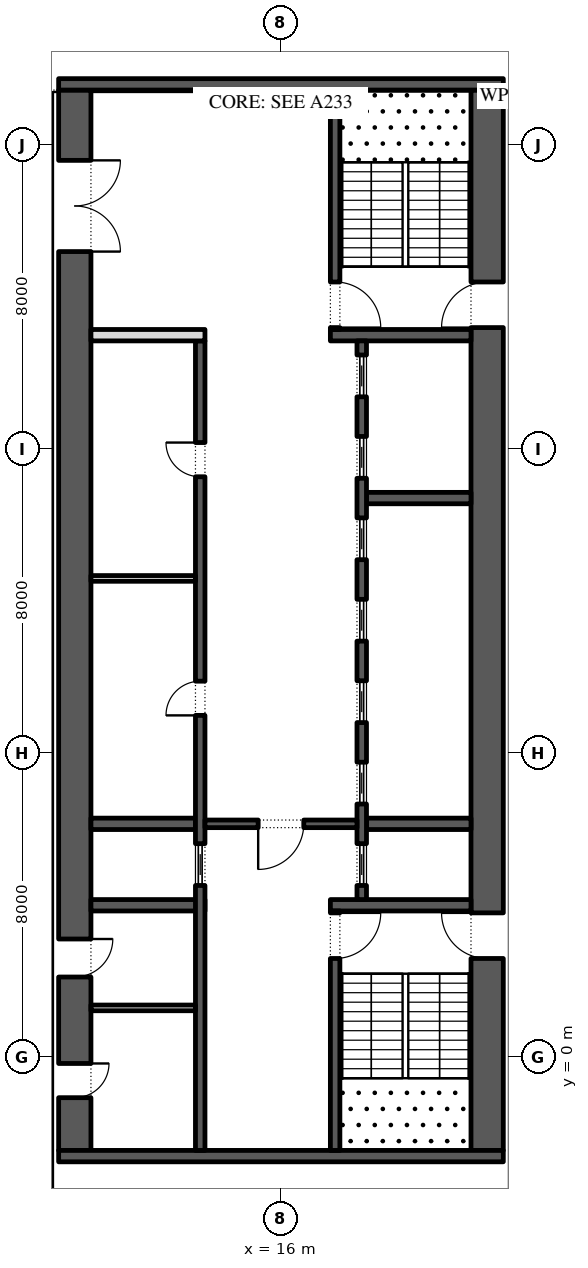
"""IFC4 building model, lengths in metres.
Left out: names, types, materials, properties, quantities, classifications, styles, units other than length and angle.
Written with IfcOpenShell. Run it as: python <this file> out.ifc"""

import sys

from ifc_helpers import new_model, si_unit, direction, frame, frame_2d, origin, place, context, subcontext, project, spatial, rectangle, extrude, element, fill, save


model = new_model("IFC4")
c1 = context("Model", 3, precision=1e-05, world=origin(), true_north=direction((0.0, 1.0)))
c2 = subcontext(c1, "Body", "Model", "MODEL_VIEW")
j1 = project(units=[si_unit("LENGTHUNIT", "METRE"), si_unit("PLANEANGLEUNIT", "RADIAN")], contexts=[c1])
p1 = place(None, origin())
s1 = spatial("IfcSite", under=j1, at=p1, CompositionType="ELEMENT")
p2 = place(p1, origin())
s2 = spatial("IfcBuilding", under=s1, at=p2, CompositionType="ELEMENT")
p3 = place(p2, frame((0.0, 0.0, 139.2)))
s3 = spatial("IfcBuildingStorey", under=s2, at=p3, CompositionType="ELEMENT", Elevation=139.2)
p4 = place(p3, frame((21.425, -2.45, 0.0), z_axis=(0.0, 0.0, 1.0), x_axis=(0.0, 1.0, 0.0)))
e1 = element("IfcWall", 1, at=p4, inside=s3, PredefinedType="SHEAR", context=c2, shape_type="SweptSolid", body=[
    extrude(rectangle(XDim=27.9, YDim=0.85, at=frame_2d((13.95, 0.0))), origin(), (0.0, 0.0, 1.0), 4.0),
])
p5 = place(p4, frame((5.05, 0.0, 0.0)))
e2 = element("IfcOpeningElement", 2, at=p5, cuts=e1, PredefinedType="OPENING", context=c2, shape_type="SweptSolid", body=[
    extrude(rectangle(XDim=1.2, YDim=2.1, at=frame_2d((0.6, 1.05))), frame((0.0, 0.435, 0.0), z_axis=(0.0, -1.0, 0.0), x_axis=(1.0, 0.0, 0.0)), (0.0, 0.0, 1.0), 0.87),
])
p6 = place(p4, frame((21.65, 0.0, 0.0)))
e3 = element("IfcOpeningElement", 3, at=p6, cuts=e1, PredefinedType="OPENING", context=c2, shape_type="SweptSolid", body=[
    extrude(rectangle(XDim=1.2, YDim=2.1, at=frame_2d((0.6, 1.05))), frame((0.0, 0.435, 0.0), z_axis=(0.0, -1.0, 0.0), x_axis=(1.0, 0.0, 0.0)), (0.0, 0.0, 1.0), 0.87),
])
p7 = place(p3, frame((10.575, -2.45, 0.0), z_axis=(0.0, 0.0, 1.0), x_axis=(0.0, 1.0, 0.0)))
e4 = element("IfcWall", 4, at=p7, inside=s3, PredefinedType="SHEAR", context=c2, shape_type="SweptSolid", body=[
    extrude(rectangle(XDim=27.9, YDim=0.85, at=frame_2d((13.95, 0.0))), origin(), (0.0, 0.0, 1.0), 4.0),
])
p8 = place(p7, frame((23.65, 0.0, 0.0)))
e5 = element("IfcOpeningElement", 5, at=p8, cuts=e4, PredefinedType="OPENING", context=c2, shape_type="SweptSolid", body=[
    extrude(rectangle(XDim=2.4, YDim=2.1, at=frame_2d((1.2, 1.05))), frame((0.0, 0.435, 0.0), z_axis=(0.0, -1.0, 0.0), x_axis=(1.0, 0.0, 0.0)), (0.0, 0.0, 1.0), 0.87),
])
p9 = place(p7, frame((1.387, 0.0, 0.0)))
e6 = element("IfcOpeningElement", 6, at=p9, cuts=e4, PredefinedType="OPENING", context=c2, shape_type="SweptSolid", body=[
    extrude(rectangle(XDim=0.9, YDim=2.1, at=frame_2d((0.45, 1.05))), frame((0.0, 0.435, 0.0), z_axis=(0.0, -1.0, 0.0), x_axis=(1.0, 0.0, 0.0)), (0.0, 0.0, 1.0), 0.87),
])
p10 = place(p7, frame((4.562, 0.0, 0.0)))
e7 = element("IfcOpeningElement", 7, at=p10, cuts=e4, PredefinedType="OPENING", context=c2, shape_type="SweptSolid", body=[
    extrude(rectangle(XDim=1.0, YDim=2.1, at=frame_2d((0.5, 1.05))), frame((0.0, 0.435, 0.0), z_axis=(0.0, -1.0, 0.0), x_axis=(1.0, 0.0, 0.0)), (0.0, 0.0, 1.0), 0.87),
])
for number, where, z_axis, x_axis in (
    (8, (10.15, -2.6, 0.0), (0.0, 0.0, 1.0), (1.0, 0.0, 0.0)),
    (9, (10.15, 25.6, 0.0), (0.0, 0.0, 1.0), (1.0, 0.0, 0.0)),
):
    element("IfcWall", number, at=place(p3, frame(where, z_axis=z_axis, x_axis=x_axis)), inside=s3, PredefinedType="SHEAR", context=c2, shape_type="SweptSolid", body=[
        extrude(rectangle(XDim=11.7, YDim=0.3, at=frame_2d((5.85, 0.0))), origin(), (0.0, 0.0, 1.0), 4.0),
    ])
p11 = place(p3, frame((17.3, 4.0, 0.0), z_axis=(0.0, 0.0, 1.0), x_axis=(1.0, 0.0, 0.0)))
e10 = element("IfcWall", 10, at=p11, inside=s3, PredefinedType="SHEAR", context=c2, shape_type="SweptSolid", body=[
    extrude(rectangle(XDim=3.7, YDim=0.3, at=frame_2d((1.85, 0.0))), origin(), (0.0, 0.0, 1.0), 4.0),
])
p12 = place(p3, frame((17.425, -2.45, 0.0), z_axis=(0.0, 0.0, 1.0), x_axis=(0.0, 1.0, 0.0)))
e11 = element("IfcWall", 11, at=p12, inside=s3, PredefinedType="SHEAR", context=c2, shape_type="SweptSolid", body=[
    extrude(rectangle(XDim=6.3, YDim=0.25, at=frame_2d((3.15, 0.0))), origin(), (0.0, 0.0, 1.0), 4.0),
])
p13 = place(p12, frame((5.05, 0.0, 0.0)))
e12 = element("IfcOpeningElement", 12, at=p13, cuts=e11, PredefinedType="OPENING", context=c2, shape_type="SweptSolid", body=[
    extrude(rectangle(XDim=1.2, YDim=2.1, at=frame_2d((0.6, 1.05))), frame((0.0, 0.135, 0.0), z_axis=(0.0, -1.0, 0.0), x_axis=(1.0, 0.0, 0.0)), (0.0, 0.0, 1.0), 0.27),
])
p14 = place(p3, frame((17.3, 19.0, 0.0), z_axis=(0.0, 0.0, 1.0), x_axis=(1.0, 0.0, 0.0)))
e13 = element("IfcWall", 13, at=p14, inside=s3, PredefinedType="SHEAR", context=c2, shape_type="SweptSolid", body=[
    extrude(rectangle(XDim=3.7, YDim=0.3, at=frame_2d((1.85, 0.0))), origin(), (0.0, 0.0, 1.0), 4.0),
])
p15 = place(p3, frame((17.425, 19.15, 0.0), z_axis=(0.0, 0.0, 1.0), x_axis=(0.0, 1.0, 0.0)))
e14 = element("IfcWall", 14, at=p15, inside=s3, PredefinedType="SHEAR", context=c2, shape_type="SweptSolid", body=[
    extrude(rectangle(XDim=6.3, YDim=0.25, at=frame_2d((3.15, 0.0))), origin(), (0.0, 0.0, 1.0), 4.0),
])
p16 = place(p15, frame((0.05, 0.0, 0.0)))
e15 = element("IfcOpeningElement", 15, at=p16, cuts=e14, PredefinedType="OPENING", context=c2, shape_type="SweptSolid", body=[
    extrude(rectangle(XDim=1.2, YDim=2.1, at=frame_2d((0.6, 1.05))), frame((0.0, 0.135, 0.0), z_axis=(0.0, -1.0, 0.0), x_axis=(1.0, 0.0, 0.0)), (0.0, 0.0, 1.0), 0.27),
])
for number, where, z_axis, x_axis in (
    (16, (18.25, 6.143, 0.0), (0.0, 0.0, 1.0), (1.0, 0.0, 0.0)),
    (17, (18.25, 14.714, 0.0), (0.0, 0.0, 1.0), (1.0, 0.0, 0.0)),
):
    element("IfcWall", number, at=place(p3, frame(where, z_axis=z_axis, x_axis=x_axis)), inside=s3, PredefinedType="SHEAR", context=c2, shape_type="SweptSolid", body=[
        extrude(rectangle(XDim=2.75, YDim=0.3, at=frame_2d((1.375, 0.0))), origin(), (0.0, 0.0, 1.0), 4.0),
    ])
p17 = place(p3, frame((18.125, 4.15, 0.0), z_axis=(0.0, 0.0, 1.0), x_axis=(0.0, 1.0, 0.0)))
e18 = element("IfcWall", 18, at=p17, inside=s3, PredefinedType="SHEAR", context=c2, shape_type="SweptSolid", body=[
    extrude(rectangle(XDim=14.7, YDim=0.25, at=frame_2d((7.35, 0.0))), origin(), (0.0, 0.0, 1.0), 4.0),
])
p18 = place(p17, frame((0.371, 0.0, 0.0)))
e19 = element("IfcOpeningElement", 19, at=p18, cuts=e18, PredefinedType="OPENING", context=c2, shape_type="SweptSolid", body=[
    extrude(rectangle(XDim=1.1, YDim=2.1, at=frame_2d((0.55, 1.05))), frame((0.0, 0.135, 0.0), z_axis=(0.0, -1.0, 0.0), x_axis=(1.0, 0.0, 0.0)), (0.0, 0.0, 1.0), 0.27),
])
p19 = place(p17, frame((2.514, 0.0, 0.0)))
e20 = element("IfcOpeningElement", 20, at=p19, cuts=e18, PredefinedType="OPENING", context=c2, shape_type="SweptSolid", body=[
    extrude(rectangle(XDim=1.1, YDim=2.1, at=frame_2d((0.55, 1.05))), frame((0.0, 0.135, 0.0), z_axis=(0.0, -1.0, 0.0), x_axis=(1.0, 0.0, 0.0)), (0.0, 0.0, 1.0), 0.27),
])
p20 = place(p17, frame((4.657, 0.0, 0.0)))
e21 = element("IfcOpeningElement", 21, at=p20, cuts=e18, PredefinedType="OPENING", context=c2, shape_type="SweptSolid", body=[
    extrude(rectangle(XDim=1.1, YDim=2.1, at=frame_2d((0.55, 1.05))), frame((0.0, 0.135, 0.0), z_axis=(0.0, -1.0, 0.0), x_axis=(1.0, 0.0, 0.0)), (0.0, 0.0, 1.0), 0.27),
])
p21 = place(p17, frame((6.8, 0.0, 0.0)))
e22 = element("IfcOpeningElement", 22, at=p21, cuts=e18, PredefinedType="OPENING", context=c2, shape_type="SweptSolid", body=[
    extrude(rectangle(XDim=1.1, YDim=2.1, at=frame_2d((0.55, 1.05))), frame((0.0, 0.135, 0.0), z_axis=(0.0, -1.0, 0.0), x_axis=(1.0, 0.0, 0.0)), (0.0, 0.0, 1.0), 0.27),
])
p22 = place(p17, frame((8.943, 0.0, 0.0)))
e23 = element("IfcOpeningElement", 23, at=p22, cuts=e18, PredefinedType="OPENING", context=c2, shape_type="SweptSolid", body=[
    extrude(rectangle(XDim=1.1, YDim=2.1, at=frame_2d((0.55, 1.05))), frame((0.0, 0.135, 0.0), z_axis=(0.0, -1.0, 0.0), x_axis=(1.0, 0.0, 0.0)), (0.0, 0.0, 1.0), 0.27),
])
p23 = place(p17, frame((11.086, 0.0, 0.0)))
e24 = element("IfcOpeningElement", 24, at=p23, cuts=e18, PredefinedType="OPENING", context=c2, shape_type="SweptSolid", body=[
    extrude(rectangle(XDim=1.1, YDim=2.1, at=frame_2d((0.55, 1.05))), frame((0.0, 0.135, 0.0), z_axis=(0.0, -1.0, 0.0), x_axis=(1.0, 0.0, 0.0)), (0.0, 0.0, 1.0), 0.27),
])
p24 = place(p17, frame((13.229, 0.0, 0.0)))
e25 = element("IfcOpeningElement", 25, at=p24, cuts=e18, PredefinedType="OPENING", context=c2, shape_type="SweptSolid", body=[
    extrude(rectangle(XDim=1.1, YDim=2.1, at=frame_2d((0.55, 1.05))), frame((0.0, 0.135, 0.0), z_axis=(0.0, -1.0, 0.0), x_axis=(1.0, 0.0, 0.0)), (0.0, 0.0, 1.0), 0.27),
])
p25 = place(p3, frame((11.0, 4.0, 0.0), z_axis=(0.0, 0.0, 1.0), x_axis=(1.0, 0.0, 0.0)))
e26 = element("IfcWall", 26, at=p25, inside=s3, PredefinedType="SHEAR", context=c2, shape_type="SweptSolid", body=[
    extrude(rectangle(XDim=3.0, YDim=0.3, at=frame_2d((1.5, 0.0))), origin(), (0.0, 0.0, 1.0), 4.0),
])
p26 = place(p3, frame((11.0, 6.143, 0.0), z_axis=(0.0, 0.0, 1.0), x_axis=(1.0, 0.0, 0.0)))
e27 = element("IfcWall", 27, at=p26, inside=s3, PredefinedType="SHEAR", context=c2, shape_type="SweptSolid", body=[
    extrude(rectangle(XDim=2.75, YDim=0.3, at=frame_2d((1.375, 0.0))), origin(), (0.0, 0.0, 1.0), 4.0),
])
p27 = place(p3, frame((13.875, -2.45, 0.0), z_axis=(0.0, 0.0, 1.0), x_axis=(0.0, 1.0, 0.0)))
e28 = element("IfcWall", 28, at=p27, inside=s3, PredefinedType="SHEAR", context=c2, shape_type="SweptSolid", body=[
    extrude(rectangle(XDim=21.3, YDim=0.25, at=frame_2d((10.65, 0.0))), origin(), (0.0, 0.0, 1.0), 4.0),
])
p28 = place(p27, frame((11.446, 0.0, 0.0)))
e29 = element("IfcOpeningElement", 29, at=p28, cuts=e28, PredefinedType="OPENING", context=c2, shape_type="SweptSolid", body=[
    extrude(rectangle(XDim=0.9, YDim=2.1, at=frame_2d((0.45, 1.05))), frame((0.0, 0.135, 0.0), z_axis=(0.0, -1.0, 0.0), x_axis=(1.0, 0.0, 0.0)), (0.0, 0.0, 1.0), 0.27),
])
p29 = place(p27, frame((17.725, 0.0, 0.0)))
e30 = element("IfcOpeningElement", 30, at=p29, cuts=e28, PredefinedType="OPENING", context=c2, shape_type="SweptSolid", body=[
    extrude(rectangle(XDim=0.9, YDim=2.1, at=frame_2d((0.45, 1.05))), frame((0.0, 0.135, 0.0), z_axis=(0.0, -1.0, 0.0), x_axis=(1.0, 0.0, 0.0)), (0.0, 0.0, 1.0), 0.27),
])
p30 = place(p27, frame((6.971, 0.0, 0.0)))
e31 = element("IfcOpeningElement", 31, at=p30, cuts=e28, PredefinedType="OPENING", context=c2, shape_type="SweptSolid", body=[
    extrude(rectangle(XDim=1.1, YDim=2.1, at=frame_2d((0.55, 1.05))), frame((0.0, 0.135, 0.0), z_axis=(0.0, -1.0, 0.0), x_axis=(1.0, 0.0, 0.0)), (0.0, 0.0, 1.0), 0.27),
])
p31 = place(p3, frame((11.0, 19.0, 0.0), z_axis=(0.0, 0.0, 1.0), x_axis=(1.0, 0.0, 0.0)))
e32 = element("IfcWall", 32, at=p31, inside=s3, PredefinedType="PARTITIONING", context=c2, shape_type="SweptSolid", body=[
    extrude(rectangle(XDim=3.0, YDim=0.3, at=frame_2d((1.5, 0.0))), origin(), (0.0, 0.0, 1.0), 4.0),
])
p32 = place(p3, frame((11.0, 12.6, 0.0), z_axis=(0.0, 0.0, 1.0), x_axis=(1.0, 0.0, 0.0)))
e33 = element("IfcWall", 33, at=p32, inside=s3, PredefinedType="PARTITIONING", context=c2, shape_type="SweptSolid", body=[
    extrude(rectangle(XDim=2.75, YDim=0.15, at=frame_2d((1.375, 0.0))), origin(), (0.0, 0.0, 1.0), 4.0),
])
p33 = place(p3, frame((14.0, 6.143, 0.0), z_axis=(0.0, 0.0, 1.0), x_axis=(1.0, 0.0, 0.0)))
e34 = element("IfcWall", 34, at=p33, inside=s3, PredefinedType="SHEAR", context=c2, shape_type="SweptSolid", body=[
    extrude(rectangle(XDim=4.0, YDim=0.2, at=frame_2d((2.0, 0.0))), origin(), (0.0, 0.0, 1.0), 4.0),
])
p34 = place(p33, frame((1.4, 0.0, 0.0)))
e35 = element("IfcOpeningElement", 35, at=p34, cuts=e34, PredefinedType="OPENING", context=c2, shape_type="SweptSolid", body=[
    extrude(rectangle(XDim=1.2, YDim=2.1, at=frame_2d((0.6, 1.05))), frame((0.0, 0.11, 0.0), z_axis=(0.0, -1.0, 0.0), x_axis=(1.0, 0.0, 0.0)), (0.0, 0.0, 1.0), 0.22),
])
p35 = place(p3, frame((11.0, 1.3, 0.0), z_axis=(0.0, 0.0, 1.0), x_axis=(1.0, 0.0, 0.0)))
e36 = element("IfcWall", 36, at=p35, inside=s3, PredefinedType="PARTITIONING", context=c2, shape_type="SweptSolid", body=[
    extrude(rectangle(XDim=2.75, YDim=0.15, at=frame_2d((1.375, 0.0))), origin(), (0.0, 0.0, 1.0), 4.0),
])
p36 = place(p18, origin())
e37 = element("IfcDoor", 37, at=p36, inside=s3, OperationType="SLIDING_TO_LEFT", PredefinedType="DOOR", context=c2, shape_type="SweptSolid", body=[
    extrude(rectangle(XDim=1.1, YDim=2.1, at=frame_2d((0.55, 1.05))), frame((0.0, 0.025, 0.0), z_axis=(0.0, -1.0, 0.0), x_axis=(1.0, 0.0, 0.0)), (0.0, 0.0, 1.0), 0.05),
])
fill(e19, e37)
p37 = place(p19, origin())
e38 = element("IfcDoor", 38, at=p37, inside=s3, OperationType="SLIDING_TO_LEFT", PredefinedType="DOOR", context=c2, shape_type="SweptSolid", body=[
    extrude(rectangle(XDim=1.1, YDim=2.1, at=frame_2d((0.55, 1.05))), frame((0.0, 0.025, 0.0), z_axis=(0.0, -1.0, 0.0), x_axis=(1.0, 0.0, 0.0)), (0.0, 0.0, 1.0), 0.05),
])
fill(e20, e38)
p38 = place(p20, origin())
e39 = element("IfcDoor", 39, at=p38, inside=s3, OperationType="SLIDING_TO_LEFT", PredefinedType="DOOR", context=c2, shape_type="SweptSolid", body=[
    extrude(rectangle(XDim=1.1, YDim=2.1, at=frame_2d((0.55, 1.05))), frame((0.0, 0.025, 0.0), z_axis=(0.0, -1.0, 0.0), x_axis=(1.0, 0.0, 0.0)), (0.0, 0.0, 1.0), 0.05),
])
fill(e21, e39)
p39 = place(p21, origin())
e40 = element("IfcDoor", 40, at=p39, inside=s3, OperationType="SLIDING_TO_LEFT", PredefinedType="DOOR", context=c2, shape_type="SweptSolid", body=[
    extrude(rectangle(XDim=1.1, YDim=2.1, at=frame_2d((0.55, 1.05))), frame((0.0, 0.025, 0.0), z_axis=(0.0, -1.0, 0.0), x_axis=(1.0, 0.0, 0.0)), (0.0, 0.0, 1.0), 0.05),
])
fill(e22, e40)
p40 = place(p22, origin())
e41 = element("IfcDoor", 41, at=p40, inside=s3, OperationType="SLIDING_TO_LEFT", PredefinedType="DOOR", context=c2, shape_type="SweptSolid", body=[
    extrude(rectangle(XDim=1.1, YDim=2.1, at=frame_2d((0.55, 1.05))), frame((0.0, 0.025, 0.0), z_axis=(0.0, -1.0, 0.0), x_axis=(1.0, 0.0, 0.0)), (0.0, 0.0, 1.0), 0.05),
])
fill(e23, e41)
p41 = place(p23, origin())
e42 = element("IfcDoor", 42, at=p41, inside=s3, OperationType="SLIDING_TO_LEFT", PredefinedType="DOOR", context=c2, shape_type="SweptSolid", body=[
    extrude(rectangle(XDim=1.1, YDim=2.1, at=frame_2d((0.55, 1.05))), frame((0.0, 0.025, 0.0), z_axis=(0.0, -1.0, 0.0), x_axis=(1.0, 0.0, 0.0)), (0.0, 0.0, 1.0), 0.05),
])
fill(e24, e42)
p42 = place(p24, origin())
e43 = element("IfcDoor", 43, at=p42, inside=s3, OperationType="SLIDING_TO_LEFT", PredefinedType="DOOR", context=c2, shape_type="SweptSolid", body=[
    extrude(rectangle(XDim=1.1, YDim=2.1, at=frame_2d((0.55, 1.05))), frame((0.0, 0.025, 0.0), z_axis=(0.0, -1.0, 0.0), x_axis=(1.0, 0.0, 0.0)), (0.0, 0.0, 1.0), 0.05),
])
fill(e25, e43)
p43 = place(p28, origin())
e44 = element("IfcDoor", 44, at=p43, inside=s3, OperationType="SINGLE_SWING_RIGHT", PredefinedType="DOOR", context=c2, shape_type="SweptSolid", body=[
    extrude(rectangle(XDim=0.9, YDim=2.1, at=frame_2d((0.45, 1.05))), frame((0.0, 0.125, 0.0), z_axis=(0.0, -1.0, 0.0), x_axis=(1.0, 0.0, 0.0)), (0.0, 0.0, 1.0), 0.05),
])
fill(e29, e44)
p44 = place(p29, origin())
e45 = element("IfcDoor", 45, at=p44, inside=s3, OperationType="SINGLE_SWING_LEFT", PredefinedType="DOOR", context=c2, shape_type="SweptSolid", body=[
    extrude(rectangle(XDim=0.9, YDim=2.1, at=frame_2d((0.45, 1.05))), frame((0.0, 0.125, 0.0), z_axis=(0.0, -1.0, 0.0), x_axis=(1.0, 0.0, 0.0)), (0.0, 0.0, 1.0), 0.05),
])
fill(e30, e45)
p45 = place(p30, origin())
e46 = element("IfcDoor", 46, at=p45, inside=s3, OperationType="SLIDING_TO_LEFT", PredefinedType="DOOR", context=c2, shape_type="SweptSolid", body=[
    extrude(rectangle(XDim=1.1, YDim=2.1, at=frame_2d((0.55, 1.05))), frame((0.0, 0.025, 0.0), z_axis=(0.0, -1.0, 0.0), x_axis=(1.0, 0.0, 0.0)), (0.0, 0.0, 1.0), 0.05),
])
fill(e31, e46)
p46 = place(p34, frame((1.2, 0.0, 0.0), z_axis=(0.0, 0.0, 1.0), x_axis=(-1.0, 0.0, 0.0)))
e47 = element("IfcDoor", 47, at=p46, inside=s3, OperationType="SINGLE_SWING_LEFT", PredefinedType="DOOR", context=c2, shape_type="SweptSolid", body=[
    extrude(rectangle(XDim=1.2, YDim=2.1, at=frame_2d((0.6, 1.05))), frame((0.0, 0.025, 0.0), z_axis=(0.0, -1.0, 0.0), x_axis=(1.0, 0.0, 0.0)), (0.0, 0.0, 1.0), 0.05),
])
fill(e35, e47)
p47 = place(p8, frame((2.4, 0.0, 0.0), z_axis=(0.0, 0.0, 1.0), x_axis=(-1.0, 0.0, 0.0)))
e48 = element("IfcDoor", 48, at=p47, inside=s3, OperationType="DOUBLE_DOOR_SINGLE_SWING", PredefinedType="DOOR", context=c2, shape_type="SweptSolid", body=[
    extrude(rectangle(XDim=2.4, YDim=2.1, at=frame_2d((1.2, 1.05))), frame((0.0, 0.025, 0.0), z_axis=(0.0, -1.0, 0.0), x_axis=(1.0, 0.0, 0.0)), (0.0, 0.0, 1.0), 0.05),
])
fill(e5, e48)
p48 = place(p13, frame((1.2, 0.0, 0.0), z_axis=(0.0, 0.0, 1.0), x_axis=(-1.0, 0.0, 0.0)))
e49 = element("IfcDoor", 49, at=p48, inside=s3, OperationType="SINGLE_SWING_RIGHT", PredefinedType="DOOR", context=c2, shape_type="SweptSolid", body=[
    extrude(rectangle(XDim=1.2, YDim=2.1, at=frame_2d((0.6, 1.05))), frame((0.0, 0.025, 0.0), z_axis=(0.0, -1.0, 0.0), x_axis=(1.0, 0.0, 0.0)), (0.0, 0.0, 1.0), 0.05),
])
fill(e12, e49)
p49 = place(p5, origin())
e50 = element("IfcDoor", 50, at=p49, inside=s3, OperationType="SINGLE_SWING_LEFT", PredefinedType="DOOR", context=c2, shape_type="SweptSolid", body=[
    extrude(rectangle(XDim=1.2, YDim=2.1, at=frame_2d((0.6, 1.05))), frame((0.0, 0.025, 0.0), z_axis=(0.0, -1.0, 0.0), x_axis=(1.0, 0.0, 0.0)), (0.0, 0.0, 1.0), 0.05),
])
fill(e2, e50)
p50 = place(p16, frame((1.2, 0.0, 0.0), z_axis=(0.0, 0.0, 1.0), x_axis=(-1.0, 0.0, 0.0)))
e51 = element("IfcDoor", 51, at=p50, inside=s3, OperationType="SINGLE_SWING_LEFT", PredefinedType="DOOR", context=c2, shape_type="SweptSolid", body=[
    extrude(rectangle(XDim=1.2, YDim=2.1, at=frame_2d((0.6, 1.05))), frame((0.0, 0.025, 0.0), z_axis=(0.0, -1.0, 0.0), x_axis=(1.0, 0.0, 0.0)), (0.0, 0.0, 1.0), 0.05),
])
fill(e15, e51)
p51 = place(p6, origin())
e52 = element("IfcDoor", 52, at=p51, inside=s3, OperationType="SINGLE_SWING_RIGHT", PredefinedType="DOOR", context=c2, shape_type="SweptSolid", body=[
    extrude(rectangle(XDim=1.2, YDim=2.1, at=frame_2d((0.6, 1.05))), frame((0.0, 0.025, 0.0), z_axis=(0.0, -1.0, 0.0), x_axis=(1.0, 0.0, 0.0)), (0.0, 0.0, 1.0), 0.05),
])
fill(e3, e52)
p52 = place(p9, frame((0.9, -0.8, 0.0), z_axis=(0.0, 0.0, 1.0), x_axis=(-1.0, 0.0, 0.0)))
e53 = element("IfcDoor", 53, at=p52, inside=s3, OperationType="SINGLE_SWING_RIGHT", PredefinedType="DOOR", context=c2, shape_type="SweptSolid", body=[
    extrude(rectangle(XDim=0.9, YDim=2.1, at=frame_2d((0.45, 1.05))), frame((0.0, -0.375, 0.0), z_axis=(0.0, -1.0, 0.0), x_axis=(1.0, 0.0, 0.0)), (0.0, 0.0, 1.0), 0.05),
])
fill(e6, e53)
p53 = place(p10, frame((1.0, -0.8, 0.0), z_axis=(0.0, 0.0, 1.0), x_axis=(-1.0, 0.0, 0.0)))
e54 = element("IfcDoor", 54, at=p53, inside=s3, OperationType="SINGLE_SWING_RIGHT", PredefinedType="DOOR", context=c2, shape_type="SweptSolid", body=[
    extrude(rectangle(XDim=1.0, YDim=2.1, at=frame_2d((0.5, 1.05))), frame((0.0, -0.375, 0.0), z_axis=(0.0, -1.0, 0.0), x_axis=(1.0, 0.0, 0.0)), (0.0, 0.0, 1.0), 0.05),
])
fill(e7, e54)
save(model, sys.argv[1])
